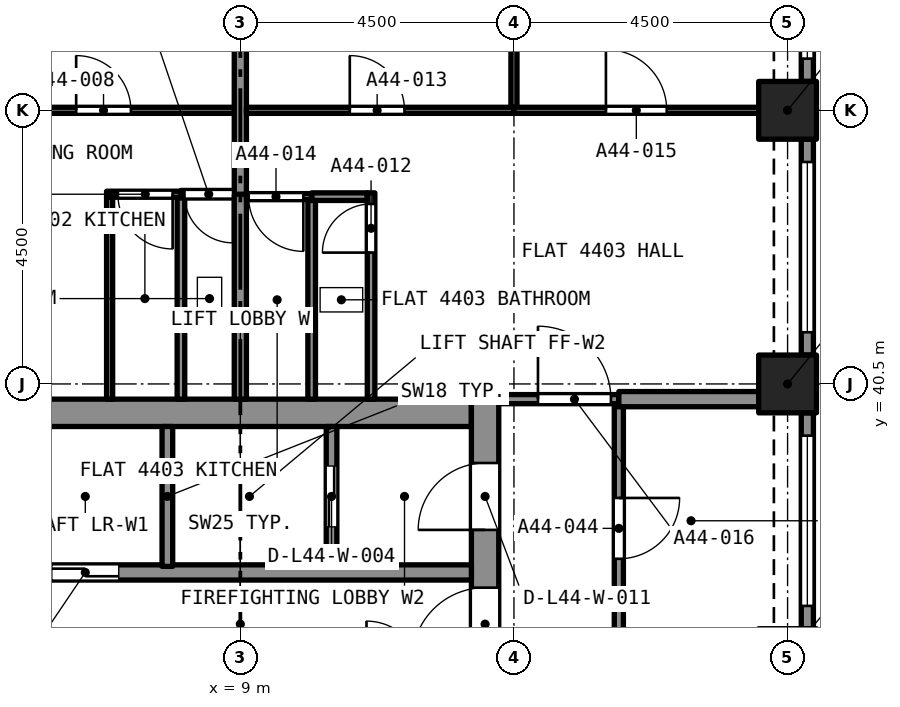
"""IFC4 building model, lengths in metres.
Left out: names, types, materials, properties, quantities, classifications, styles, units other than length and angle.
Written with IfcOpenShell. Run it as: python <this file> out.ifc"""

import sys

from ifc_helpers import new_model, si_unit, direction, frame, frame_2d, origin, origin_2d, place, context, subcontext, project, spatial, rectangle, extrude, element, fill, save


model = new_model("IFC4")
c1 = context("Model", 3, precision=1e-05, world=origin(), true_north=direction((0.0, 1.0)))
c2 = subcontext(c1, "Body", "Model", "MODEL_VIEW")
j1 = project(units=[si_unit("LENGTHUNIT", "METRE"), si_unit("PLANEANGLEUNIT", "RADIAN")], contexts=[c1])
p1 = place(None, origin())
s1 = spatial("IfcSite", under=j1, at=p1, CompositionType="ELEMENT")
p2 = place(p1, origin())
s2 = spatial("IfcBuilding", under=s1, at=p2, CompositionType="ELEMENT")
p3 = place(p2, frame((0.0, 0.0, 159.4)))
s3 = spatial("IfcBuildingStorey", under=s2, at=p3, CompositionType="ELEMENT", Elevation=159.4)
for number, where, z_axis, x_axis in (
    (1, (18.0, 40.5, 0.0), (0.0, 0.0, 1.0), (1.0, 0.0, 0.0)),
    (2, (18.0, 45.0, 0.0), (0.0, 0.0, 1.0), (1.0, 0.0, 0.0)),
):
    element("IfcColumn", number, at=place(p3, frame(where, z_axis=z_axis, x_axis=x_axis)), inside=s3, PredefinedType="COLUMN", context=c2, shape_type="SweptSolid", body=[
        extrude(rectangle(XDim=0.95, YDim=0.95, at=origin_2d()), origin(), (0.0, 0.0, 1.0), 4.4),
    ])
p4 = place(p3, frame((5.2, 40.025, 0.0), z_axis=(0.0, 0.0, 1.0), x_axis=(1.0, 0.0, 0.0)))
e3 = element("IfcWall", 3, at=p4, inside=s3, PredefinedType="SOLIDWALL", context=c2, shape_type="SweptSolid", body=[
    extrude(rectangle(XDim=7.6, YDim=0.45, at=frame_2d((3.8, 0.0))), origin(), (0.0, 0.0, 1.0), 4.4),
])
p5 = place(p3, frame((13.025, 27.25, 0.0), z_axis=(0.0, 0.0, 1.0), x_axis=(0.0, 1.0, 0.0)))
e4 = element("IfcWall", 4, at=p5, inside=s3, PredefinedType="SOLIDWALL", context=c2, shape_type="SweptSolid", body=[
    extrude(rectangle(XDim=13.0, YDim=0.45, at=frame_2d((6.5, 0.0))), origin(), (0.0, 0.0, 1.0), 4.4),
])
p6 = place(p5, frame((10.85, 0.0, 0.0)))
e5 = element("IfcOpeningElement", 5, at=p6, cuts=e4, PredefinedType="OPENING", context=c2, shape_type="SweptSolid", body=[
    extrude(rectangle(XDim=1.1, YDim=2.1, at=frame_2d((0.55, 1.05))), frame((0.0, 0.235, 0.0), z_axis=(0.0, -1.0, 0.0), x_axis=(1.0, 0.0, 0.0)), (0.0, 0.0, 1.0), 0.47),
])
p7 = place(p5, frame((8.7, 0.0, 0.0)))
e6 = element("IfcOpeningElement", 6, at=p7, cuts=e4, PredefinedType="OPENING", context=c2, shape_type="SweptSolid", body=[
    extrude(rectangle(XDim=1.2, YDim=2.1, at=frame_2d((0.6, 1.05))), frame((0.0, 0.235, 0.0), z_axis=(0.0, -1.0, 0.0), x_axis=(1.0, 0.0, 0.0)), (0.0, 0.0, 1.0), 0.47),
])
p8 = place(p3, frame((18.325, 40.025, 0.0), z_axis=(0.0, 0.0, 1.0), x_axis=(0.0, -1.0, 0.0)))
e7 = element("IfcWall", 7, at=p8, inside=s3, PredefinedType="SOLIDWALL", context=c2, shape_type="SweptSolid", body=[
    extrude(rectangle(XDim=3.55, YDim=0.2, at=frame_2d((1.775, 0.0))), origin(), (0.0, 0.0, 1.0), 4.4),
])
p9 = place(p8, frame((0.375, 0.0, 0.45)))
e8 = element("IfcOpeningElement", 8, at=p9, cuts=e7, PredefinedType="OPENING", context=c2, shape_type="SweptSolid", body=[
    extrude(rectangle(XDim=2.8, YDim=2.55, at=frame_2d((1.4, 1.275))), frame((0.0, 0.11, 0.0), z_axis=(0.0, -1.0, 0.0), x_axis=(1.0, 0.0, 0.0)), (0.0, 0.0, 1.0), 0.22),
])
p10 = place(p3, frame((18.325, 44.525, 0.0), z_axis=(0.0, 0.0, 1.0), x_axis=(0.0, -1.0, 0.0)))
e9 = element("IfcWall", 9, at=p10, inside=s3, PredefinedType="SOLIDWALL", context=c2, shape_type="SweptSolid", body=[
    extrude(rectangle(XDim=3.55, YDim=0.2, at=frame_2d((1.775, 0.0))), origin(), (0.0, 0.0, 1.0), 4.4),
])
p11 = place(p10, frame((0.375, 0.0, 0.45)))
e10 = element("IfcOpeningElement", 10, at=p11, cuts=e9, PredefinedType="OPENING", context=c2, shape_type="SweptSolid", body=[
    extrude(rectangle(XDim=2.8, YDim=2.55, at=frame_2d((1.4, 1.275))), frame((0.0, 0.11, 0.0), z_axis=(0.0, -1.0, 0.0), x_axis=(1.0, 0.0, 0.0)), (0.0, 0.0, 1.0), 0.22),
])
p12 = place(p3, frame((18.325, 49.025, 0.0), z_axis=(0.0, 0.0, 1.0), x_axis=(0.0, -1.0, 0.0)))
e11 = element("IfcWall", 11, at=p12, inside=s3, PredefinedType="SOLIDWALL", context=c2, shape_type="SweptSolid", body=[
    extrude(rectangle(XDim=3.55, YDim=0.2, at=frame_2d((1.775, 0.0))), origin(), (0.0, 0.0, 1.0), 4.4),
])
p13 = place(p12, frame((0.375, 0.0, 0.45)))
e12 = element("IfcOpeningElement", 12, at=p13, cuts=e11, PredefinedType="OPENING", context=c2, shape_type="SweptSolid", body=[
    extrude(rectangle(XDim=2.8, YDim=2.55, at=frame_2d((1.4, 1.275))), frame((0.0, 0.11, 0.0), z_axis=(0.0, -1.0, 0.0), x_axis=(1.0, 0.0, 0.0)), (0.0, 0.0, 1.0), 0.22),
])
p14 = place(p3, frame((9.0, 43.62, 0.0), z_axis=(0.0, 0.0, 1.0), x_axis=(-1.0, 0.0, 0.0)))
e13 = element("IfcWall", 13, at=p14, inside=s3, PredefinedType="PARTITIONING", context=c2, shape_type="SweptSolid", body=[
    extrude(rectangle(XDim=0.977, YDim=0.125, at=frame_2d((0.489, 0.0))), origin(), (0.0, 0.0, 1.0), 4.1),
])
p15 = place(p14, frame((0.12, 0.0, 0.0)))
e14 = element("IfcOpeningElement", 14, at=p15, cuts=e13, PredefinedType="OPENING", context=c2, shape_type="SweptSolid", body=[
    extrude(rectangle(XDim=0.8, YDim=2.1, at=frame_2d((0.4, 1.05))), frame((0.0, 0.073, 0.0), z_axis=(0.0, -1.0, 0.0), x_axis=(1.0, 0.0, 0.0)), (0.0, 0.0, 1.0), 0.145),
])
p16 = place(p3, frame((8.023, 40.25, 0.0), z_axis=(0.0, 0.0, 1.0), x_axis=(0.0, 1.0, 0.0)))
e15 = element("IfcWall", 15, at=p16, inside=s3, PredefinedType="PARTITIONING", context=c2, shape_type="SweptSolid", body=[
    extrude(rectangle(XDim=3.308, YDim=0.125, at=frame_2d((1.654, 0.0))), origin(), (0.0, 0.0, 1.0), 4.1),
])
p17 = place(p3, frame((9.0, 40.25, 0.0), z_axis=(0.0, 0.0, 1.0), x_axis=(0.0, 1.0, 0.0)))
e16 = element("IfcWall", 16, at=p17, inside=s3, PredefinedType="PARTITIONING", context=c2, shape_type="SweptSolid", body=[
    extrude(rectangle(XDim=3.38, YDim=0.2, at=frame_2d((1.69, 0.0))), origin(), (0.0, 0.0, 1.0), 4.1),
])
p18 = place(p3, frame((4.5, 45.0, 0.0), z_axis=(0.0, 0.0, 1.0), x_axis=(1.0, 0.0, 0.0)))
e17 = element("IfcWall", 17, at=p18, inside=s3, PredefinedType="PARTITIONING", context=c2, shape_type="SweptSolid", body=[
    extrude(rectangle(XDim=4.4, YDim=0.1, at=frame_2d((2.2, 0.0))), origin(), (0.0, 0.0, 1.0), 4.1),
])
p19 = place(p18, frame((1.8, 0.0, 0.0)))
e18 = element("IfcOpeningElement", 18, at=p19, cuts=e17, PredefinedType="OPENING", context=c2, shape_type="SweptSolid", body=[
    extrude(rectangle(XDim=0.9, YDim=2.1, at=frame_2d((0.45, 1.05))), frame((0.0, 0.06, 0.0), z_axis=(0.0, -1.0, 0.0), x_axis=(1.0, 0.0, 0.0)), (0.0, 0.0, 1.0), 0.12),
])
p20 = place(p3, frame((8.023, 43.62, 0.0), z_axis=(0.0, 0.0, 1.0), x_axis=(-1.0, 0.0, 0.0)))
e19 = element("IfcWall", 19, at=p20, inside=s3, PredefinedType="PARTITIONING", context=c2, shape_type="SweptSolid", body=[
    extrude(rectangle(XDim=1.223, YDim=0.1, at=frame_2d((0.611, 0.0))), origin(), (0.0, 0.0, 1.0), 4.1),
])
p21 = place(p20, frame((0.136, 0.0, 0.0)))
e20 = element("IfcOpeningElement", 20, at=p21, cuts=e19, PredefinedType="OPENING", context=c2, shape_type="SweptSolid", body=[
    extrude(rectangle(XDim=0.9, YDim=2.1, at=frame_2d((0.45, 1.05))), frame((0.0, 0.06, 0.0), z_axis=(0.0, -1.0, 0.0), x_axis=(1.0, 0.0, 0.0)), (0.0, 0.0, 1.0), 0.12),
])
p22 = place(p3, frame((6.85, 40.25, 0.0), z_axis=(0.0, 0.0, 1.0), x_axis=(0.0, 1.0, 0.0)))
e21 = element("IfcWall", 21, at=p22, inside=s3, PredefinedType="PARTITIONING", context=c2, shape_type="SweptSolid", body=[
    extrude(rectangle(XDim=3.32, YDim=0.1, at=frame_2d((1.66, 0.0))), origin(), (0.0, 0.0, 1.0), 4.1),
])
p23 = place(p3, frame((9.0, 43.62, 0.0), z_axis=(0.0, 0.0, 1.0), x_axis=(0.0, 1.0, 0.0)))
e22 = element("IfcWall", 22, at=p23, inside=s3, PredefinedType="PARTITIONING", context=c2, shape_type="SweptSolid", body=[
    extrude(rectangle(XDim=5.405, YDim=0.2, at=frame_2d((2.702, 0.0))), origin(), (0.0, 0.0, 1.0), 4.1),
])
p24 = place(p3, frame((10.173, 43.58, 0.0), z_axis=(0.0, 0.0, 1.0), x_axis=(1.0, 0.0, 0.0)))
e23 = element("IfcWall", 23, at=p24, inside=s3, PredefinedType="PARTITIONING", context=c2, shape_type="SweptSolid", body=[
    extrude(rectangle(XDim=0.915, YDim=0.125, at=frame_2d((0.458, 0.0))), origin(), (0.0, 0.0, 1.0), 4.1),
])
p25 = place(p3, frame((11.15, 40.25, 0.0), z_axis=(0.0, 0.0, 1.0), x_axis=(0.0, 1.0, 0.0)))
e24 = element("IfcWall", 24, at=p25, inside=s3, PredefinedType="PARTITIONING", context=c2, shape_type="SweptSolid", body=[
    extrude(rectangle(XDim=3.393, YDim=0.125, at=frame_2d((1.696, 0.0))), origin(), (0.0, 0.0, 1.0), 4.1),
])
p26 = place(p25, frame((2.41, 0.0, 0.0)))
e25 = element("IfcOpeningElement", 25, at=p26, cuts=e24, PredefinedType="OPENING", context=c2, shape_type="SweptSolid", body=[
    extrude(rectangle(XDim=0.8, YDim=2.1, at=frame_2d((0.4, 1.05))), frame((0.0, 0.073, 0.0), z_axis=(0.0, -1.0, 0.0), x_axis=(1.0, 0.0, 0.0)), (0.0, 0.0, 1.0), 0.145),
])
p27 = place(p3, frame((10.173, 40.25, 0.0), z_axis=(0.0, 0.0, 1.0), x_axis=(0.0, 1.0, 0.0)))
e26 = element("IfcWall", 26, at=p27, inside=s3, PredefinedType="PARTITIONING", context=c2, shape_type="SweptSolid", body=[
    extrude(rectangle(XDim=3.268, YDim=0.125, at=frame_2d((1.634, 0.0))), origin(), (0.0, 0.0, 1.0), 4.1),
])
p28 = place(p3, frame((9.1, 45.0, 0.0), z_axis=(0.0, 0.0, 1.0), x_axis=(1.0, 0.0, 0.0)))
e27 = element("IfcWall", 27, at=p28, inside=s3, PredefinedType="PARTITIONING", context=c2, shape_type="SweptSolid", body=[
    extrude(rectangle(XDim=4.4, YDim=0.1, at=frame_2d((2.2, 0.0))), origin(), (0.0, 0.0, 1.0), 4.1),
])
p29 = place(p28, frame((1.7, 0.0, 0.0)))
e28 = element("IfcOpeningElement", 28, at=p29, cuts=e27, PredefinedType="OPENING", context=c2, shape_type="SweptSolid", body=[
    extrude(rectangle(XDim=0.9, YDim=2.1, at=frame_2d((0.45, 1.05))), frame((0.0, 0.06, 0.0), z_axis=(0.0, -1.0, 0.0), x_axis=(1.0, 0.0, 0.0)), (0.0, 0.0, 1.0), 0.12),
])
p30 = place(p3, frame((13.5, 45.05, 0.0), z_axis=(0.0, 0.0, 1.0), x_axis=(0.0, 1.0, 0.0)))
e29 = element("IfcWall", 29, at=p30, inside=s3, PredefinedType="PARTITIONING", context=c2, shape_type="SweptSolid", body=[
    extrude(rectangle(XDim=3.975, YDim=0.1, at=frame_2d((1.987, 0.0))), origin(), (0.0, 0.0, 1.0), 4.1),
])
p31 = place(p3, frame((10.173, 43.58, 0.0), z_axis=(0.0, 0.0, 1.0), x_axis=(-1.0, 0.0, 0.0)))
e30 = element("IfcWall", 30, at=p31, inside=s3, PredefinedType="PARTITIONING", context=c2, shape_type="SweptSolid", body=[
    extrude(rectangle(XDim=1.073, YDim=0.1, at=frame_2d((0.536, 0.0))), origin(), (0.0, 0.0, 1.0), 4.1),
])
p32 = place(p31, frame((0.136, 0.0, 0.0)))
e31 = element("IfcOpeningElement", 31, at=p32, cuts=e30, PredefinedType="OPENING", context=c2, shape_type="SweptSolid", body=[
    extrude(rectangle(XDim=0.9, YDim=2.1, at=frame_2d((0.45, 1.05))), frame((0.0, 0.06, 0.0), z_axis=(0.0, -1.0, 0.0), x_axis=(1.0, 0.0, 0.0)), (0.0, 0.0, 1.0), 0.12),
])
p33 = place(p3, frame((13.5, 45.0, 0.0), z_axis=(0.0, 0.0, 1.0), x_axis=(1.0, 0.0, 0.0)))
e32 = element("IfcWall", 32, at=p33, inside=s3, PredefinedType="PARTITIONING", context=c2, shape_type="SweptSolid", body=[
    extrude(rectangle(XDim=4.025, YDim=0.1, at=frame_2d((2.012, 0.0))), origin(), (0.0, 0.0, 1.0), 4.1),
])
p34 = place(p33, frame((1.512, 0.0, 0.0)))
e33 = element("IfcOpeningElement", 33, at=p34, cuts=e32, PredefinedType="OPENING", context=c2, shape_type="SweptSolid", body=[
    extrude(rectangle(XDim=1.0, YDim=2.1, at=frame_2d((0.5, 1.05))), frame((0.0, 0.06, 0.0), z_axis=(0.0, -1.0, 0.0), x_axis=(1.0, 0.0, 0.0)), (0.0, 0.0, 1.0), 0.12),
])
p35 = place(p3, frame((13.25, 40.25, 0.0), z_axis=(0.0, 0.0, 1.0), x_axis=(1.0, 0.0, 0.0)))
e34 = element("IfcWall", 34, at=p35, inside=s3, PredefinedType="PARTITIONING", context=c2, shape_type="SweptSolid", body=[
    extrude(rectangle(XDim=1.975, YDim=0.15, at=frame_2d((0.988, 0.0))), origin(), (0.0, 0.0, 1.0), 4.1),
])
p36 = place(p35, frame((0.645, 0.0, 0.0)))
e35 = element("IfcOpeningElement", 35, at=p36, cuts=e34, PredefinedType="OPENING", context=c2, shape_type="SweptSolid", body=[
    extrude(rectangle(XDim=1.2, YDim=2.4, at=frame_2d((0.6, 1.2))), frame((0.0, 0.085, 0.0), z_axis=(0.0, -1.0, 0.0), x_axis=(1.0, 0.0, 0.0)), (0.0, 0.0, 1.0), 0.17),
])
p37 = place(p3, frame((15.225, 40.25, 0.0), z_axis=(0.0, 0.0, 1.0), x_axis=(1.0, 0.0, 0.0)))
e36 = element("IfcWall", 36, at=p37, inside=s3, PredefinedType="PARTITIONING", context=c2, shape_type="SweptSolid", body=[
    extrude(rectangle(XDim=2.3, YDim=0.25, at=frame_2d((1.15, 0.0))), origin(), (0.0, 0.0, 1.0), 4.1),
])
p38 = place(p3, frame((15.225, 40.125, 0.0), z_axis=(0.0, 0.0, 1.0), x_axis=(0.0, -1.0, 0.0)))
e37 = element("IfcWall", 37, at=p38, inside=s3, PredefinedType="PARTITIONING", context=c2, shape_type="SweptSolid", body=[
    extrude(rectangle(XDim=4.125, YDim=0.15, at=frame_2d((2.062, 0.0))), origin(), (0.0, 0.0, 1.0), 4.1),
])
p39 = place(p38, frame((1.5, 0.0, 0.0)))
e38 = element("IfcOpeningElement", 38, at=p39, cuts=e37, PredefinedType="OPENING", context=c2, shape_type="SweptSolid", body=[
    extrude(rectangle(XDim=1.0, YDim=2.1, at=frame_2d((0.5, 1.05))), frame((0.0, 0.085, 0.0), z_axis=(0.0, -1.0, 0.0), x_axis=(1.0, 0.0, 0.0)), (0.0, 0.0, 1.0), 0.17),
])
p40 = place(p3, frame((5.2, 37.4, 0.0), z_axis=(0.0, 0.0, 1.0), x_axis=(1.0, 0.0, 0.0)))
e39 = element("IfcWall", 39, at=p40, inside=s3, PredefinedType="SOLIDWALL", context=c2, shape_type="SweptSolid", body=[
    extrude(rectangle(XDim=7.6, YDim=0.25, at=frame_2d((3.8, 0.0))), origin(), (0.0, 0.0, 1.0), 4.1),
])
p41 = place(p40, frame((0.7, 0.0, 0.0)))
e40 = element("IfcOpeningElement", 40, at=p41, cuts=e39, PredefinedType="OPENING", context=c2, shape_type="SweptSolid", body=[
    extrude(rectangle(XDim=1.1, YDim=2.4, at=frame_2d((0.55, 1.2))), frame((0.0, 0.135, 0.0), z_axis=(0.0, -1.0, 0.0), x_axis=(1.0, 0.0, 0.0)), (0.0, 0.0, 1.0), 0.27),
])
p42 = place(p3, frame((7.8, 37.5, 0.0), z_axis=(0.0, 0.0, 1.0), x_axis=(0.0, 1.0, 0.0)))
e41 = element("IfcWall", 41, at=p42, inside=s3, PredefinedType="SOLIDWALL", context=c2, shape_type="SweptSolid", body=[
    extrude(rectangle(XDim=2.3, YDim=0.175, at=frame_2d((1.15, 0.0))), origin(), (0.0, 0.0, 1.0), 4.1),
])
p43 = place(p3, frame((10.5, 37.5, 0.0), z_axis=(0.0, 0.0, 1.0), x_axis=(0.0, 1.0, 0.0)))
e42 = element("IfcWall", 42, at=p43, inside=s3, PredefinedType="SOLIDWALL", context=c2, shape_type="SweptSolid", body=[
    extrude(rectangle(XDim=2.3, YDim=0.175, at=frame_2d((1.15, 0.0))), origin(), (0.0, 0.0, 1.0), 4.1),
])
p44 = place(p43, frame((0.65, 0.0, 0.0)))
e43 = element("IfcOpeningElement", 43, at=p44, cuts=e42, PredefinedType="OPENING", context=c2, shape_type="SweptSolid", body=[
    extrude(rectangle(XDim=1.0, YDim=2.1, at=frame_2d((0.5, 1.05))), frame((0.0, 0.097, 0.0), z_axis=(0.0, -1.0, 0.0), x_axis=(1.0, 0.0, 0.0)), (0.0, 0.0, 1.0), 0.195),
])
p45 = place(p9, origin())
e44 = element("IfcWindow", 44, at=p45, inside=s3, PartitioningType="SINGLE_PANEL", PredefinedType="WINDOW", context=c2, shape_type="SweptSolid", body=[
    extrude(rectangle(XDim=2.8, YDim=2.55, at=frame_2d((1.4, 1.275))), frame((0.0, 0.03, 0.0), z_axis=(0.0, -1.0, 0.0), x_axis=(1.0, 0.0, 0.0)), (0.0, 0.0, 1.0), 0.06),
])
fill(e8, e44)
p46 = place(p11, origin())
e45 = element("IfcWindow", 45, at=p46, inside=s3, PartitioningType="SINGLE_PANEL", PredefinedType="WINDOW", context=c2, shape_type="SweptSolid", body=[
    extrude(rectangle(XDim=2.8, YDim=2.55, at=frame_2d((1.4, 1.275))), frame((0.0, 0.03, 0.0), z_axis=(0.0, -1.0, 0.0), x_axis=(1.0, 0.0, 0.0)), (0.0, 0.0, 1.0), 0.06),
])
fill(e10, e45)
p47 = place(p13, origin())
e46 = element("IfcWindow", 46, at=p47, inside=s3, PartitioningType="SINGLE_PANEL", PredefinedType="WINDOW", context=c2, shape_type="SweptSolid", body=[
    extrude(rectangle(XDim=2.8, YDim=2.55, at=frame_2d((1.4, 1.275))), frame((0.0, 0.03, 0.0), z_axis=(0.0, -1.0, 0.0), x_axis=(1.0, 0.0, 0.0)), (0.0, 0.0, 1.0), 0.06),
])
fill(e12, e46)
p48 = place(p15, origin())
e47 = element("IfcDoor", 47, at=p48, inside=s3, OperationType="SINGLE_SWING_LEFT", PredefinedType="DOOR", context=c2, shape_type="SweptSolid", body=[
    extrude(rectangle(XDim=0.8, YDim=2.1, at=frame_2d((0.4, 1.05))), frame((0.0, 0.025, 0.0), z_axis=(0.0, -1.0, 0.0), x_axis=(1.0, 0.0, 0.0)), (0.0, 0.0, 1.0), 0.05),
])
fill(e14, e47)
p49 = place(p19, origin())
e48 = element("IfcDoor", 48, at=p49, inside=s3, OperationType="SINGLE_SWING_RIGHT", PredefinedType="DOOR", context=c2, shape_type="SweptSolid", body=[
    extrude(rectangle(XDim=0.9, YDim=2.1, at=frame_2d((0.45, 1.05))), frame((0.0, 0.025, 0.0), z_axis=(0.0, -1.0, 0.0), x_axis=(1.0, 0.0, 0.0)), (0.0, 0.0, 1.0), 0.05),
])
fill(e18, e48)
p50 = place(p21, origin())
e49 = element("IfcDoor", 49, at=p50, inside=s3, OperationType="SINGLE_SWING_LEFT", PredefinedType="DOOR", context=c2, shape_type="SweptSolid", body=[
    extrude(rectangle(XDim=0.9, YDim=2.1, at=frame_2d((0.45, 1.05))), frame((0.0, 0.025, 0.0), z_axis=(0.0, -1.0, 0.0), x_axis=(1.0, 0.0, 0.0)), (0.0, 0.0, 1.0), 0.05),
])
fill(e20, e49)
p51 = place(p26, origin())
e50 = element("IfcDoor", 50, at=p51, inside=s3, OperationType="SINGLE_SWING_RIGHT", PredefinedType="DOOR", context=c2, shape_type="SweptSolid", body=[
    extrude(rectangle(XDim=0.8, YDim=2.1, at=frame_2d((0.4, 1.05))), frame((0.0, 0.025, 0.0), z_axis=(0.0, -1.0, 0.0), x_axis=(1.0, 0.0, 0.0)), (0.0, 0.0, 1.0), 0.05),
])
fill(e25, e50)
p52 = place(p29, origin())
e51 = element("IfcDoor", 51, at=p52, inside=s3, OperationType="SINGLE_SWING_LEFT", PredefinedType="DOOR", context=c2, shape_type="SweptSolid", body=[
    extrude(rectangle(XDim=0.9, YDim=2.1, at=frame_2d((0.45, 1.05))), frame((0.0, 0.025, 0.0), z_axis=(0.0, -1.0, 0.0), x_axis=(1.0, 0.0, 0.0)), (0.0, 0.0, 1.0), 0.05),
])
fill(e28, e51)
p53 = place(p32, origin())
e52 = element("IfcDoor", 52, at=p53, inside=s3, OperationType="SINGLE_SWING_RIGHT", PredefinedType="DOOR", context=c2, shape_type="SweptSolid", body=[
    extrude(rectangle(XDim=0.9, YDim=2.1, at=frame_2d((0.45, 1.05))), frame((0.0, 0.025, 0.0), z_axis=(0.0, -1.0, 0.0), x_axis=(1.0, 0.0, 0.0)), (0.0, 0.0, 1.0), 0.05),
])
fill(e31, e52)
p54 = place(p34, origin())
e53 = element("IfcDoor", 53, at=p54, inside=s3, OperationType="SINGLE_SWING_RIGHT", PredefinedType="DOOR", context=c2, shape_type="SweptSolid", body=[
    extrude(rectangle(XDim=1.0, YDim=2.1, at=frame_2d((0.5, 1.05))), frame((0.0, 0.025, 0.0), z_axis=(0.0, -1.0, 0.0), x_axis=(1.0, 0.0, 0.0)), (0.0, 0.0, 1.0), 0.05),
])
fill(e33, e53)
p55 = place(p36, origin())
e54 = element("IfcDoor", 54, at=p55, inside=s3, OperationType="SINGLE_SWING_RIGHT", PredefinedType="DOOR", context=c2, shape_type="SweptSolid", body=[
    extrude(rectangle(XDim=1.2, YDim=2.4, at=frame_2d((0.6, 1.2))), frame((0.0, 0.025, 0.0), z_axis=(0.0, -1.0, 0.0), x_axis=(1.0, 0.0, 0.0)), (0.0, 0.0, 1.0), 0.05),
])
fill(e35, e54)
p56 = place(p39, origin())
e55 = element("IfcDoor", 55, at=p56, inside=s3, OperationType="SINGLE_SWING_LEFT", PredefinedType="DOOR", context=c2, shape_type="SweptSolid", body=[
    extrude(rectangle(XDim=1.0, YDim=2.1, at=frame_2d((0.5, 1.05))), frame((0.0, 0.025, 0.0), z_axis=(0.0, -1.0, 0.0), x_axis=(1.0, 0.0, 0.0)), (0.0, 0.0, 1.0), 0.05),
])
fill(e38, e55)
p57 = place(p41, origin())
e56 = element("IfcDoor", 56, at=p57, inside=s3, OperationType="SLIDING_TO_LEFT", PredefinedType="DOOR", context=c2, shape_type="SweptSolid", body=[
    extrude(rectangle(XDim=1.1, YDim=2.4, at=frame_2d((0.55, 1.2))), frame((0.0, 0.025, 0.0), z_axis=(0.0, -1.0, 0.0), x_axis=(1.0, 0.0, 0.0)), (0.0, 0.0, 1.0), 0.05),
])
fill(e40, e56)
p58 = place(p44, origin())
e57 = element("IfcDoor", 57, at=p58, inside=s3, OperationType="SLIDING_TO_LEFT", PredefinedType="DOOR", context=c2, shape_type="SweptSolid", body=[
    extrude(rectangle(XDim=1.0, YDim=2.1, at=frame_2d((0.5, 1.05))), frame((0.0, 0.025, 0.0), z_axis=(0.0, -1.0, 0.0), x_axis=(1.0, 0.0, 0.0)), (0.0, 0.0, 1.0), 0.05),
])
fill(e43, e57)
p59 = place(p6, origin())
e58 = element("IfcDoor", 58, at=p59, inside=s3, OperationType="SINGLE_SWING_LEFT", PredefinedType="DOOR", context=c2, shape_type="SweptSolid", body=[
    extrude(rectangle(XDim=1.1, YDim=2.1, at=frame_2d((0.55, 1.05))), frame((0.0, 0.025, 0.0), z_axis=(0.0, -1.0, 0.0), x_axis=(1.0, 0.0, 0.0)), (0.0, 0.0, 1.0), 0.05),
])
fill(e5, e58)
p60 = place(p7, origin())
e59 = element("IfcDoor", 59, at=p60, inside=s3, OperationType="SINGLE_SWING_LEFT", PredefinedType="DOOR", context=c2, shape_type="SweptSolid", body=[
    extrude(rectangle(XDim=1.2, YDim=2.1, at=frame_2d((0.6, 1.05))), frame((0.0, 0.025, 0.0), z_axis=(0.0, -1.0, 0.0), x_axis=(1.0, 0.0, 0.0)), (0.0, 0.0, 1.0), 0.05),
])
fill(e6, e59)
save(model, sys.argv[1])
